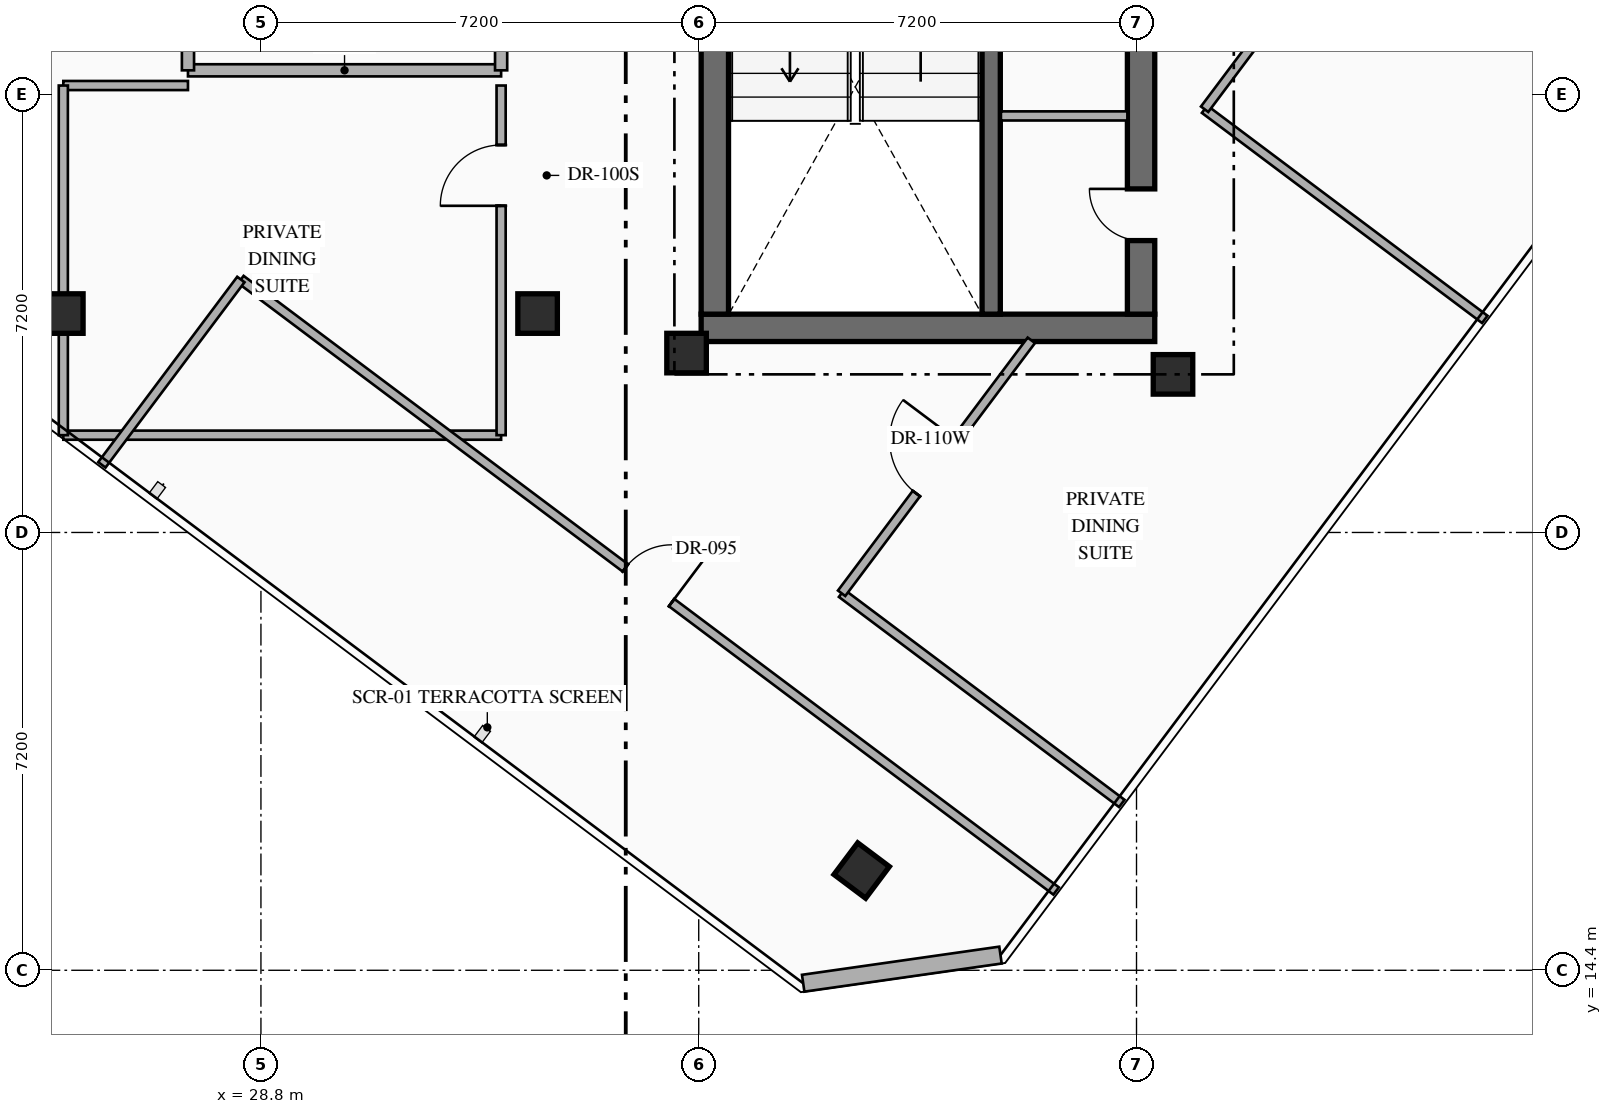
"""IFC4 building model, lengths in metres.
Left out: names, types, materials, properties, quantities, classifications, styles, units other than length and angle.
Written with IfcOpenShell. Run it as: python <this file> out.ifc"""

import sys

from ifc_helpers import new_model, si_unit, direction, frame, frame_2d, origin, origin_2d, place, context, subcontext, project, spatial, rectangle, hollow_rectangle, extrude, element, fill, save


model = new_model("IFC4")
c1 = context("Model", 3, precision=1e-05, world=origin(), true_north=direction((0.0, 1.0)))
c2 = subcontext(c1, "Body", "Model", "MODEL_VIEW")
j1 = project(units=[si_unit("LENGTHUNIT", "METRE"), si_unit("PLANEANGLEUNIT", "RADIAN")], contexts=[c1])
p1 = place(None, origin())
s1 = spatial("IfcSite", under=j1, at=p1, CompositionType="ELEMENT")
p2 = place(p1, origin())
s2 = spatial("IfcBuilding", under=s1, at=p2, CompositionType="ELEMENT")
p3 = place(p2, frame((0.0, 0.0, 257.55)))
s3 = spatial("IfcBuildingStorey", under=s2, at=p3, CompositionType="ELEMENT", Elevation=257.55)
p4 = place(p3, frame((36.04, 24.965, 0.0), z_axis=(0.0, 0.0, 1.0), x_axis=(1.0, 0.0, 0.0)))
e1 = element("IfcWall", 1, at=p4, inside=s3, PredefinedType="SHEAR", context=c2, shape_type="SweptSolid", body=[
    extrude(rectangle(XDim=7.46, YDim=0.45, at=frame_2d((3.73, 0.0))), origin(), (0.0, 0.0, 1.0), 4.2),
])
p5 = place(p3, frame((36.265, 25.19, 0.0), z_axis=(0.0, 0.0, 1.0), x_axis=(0.0, 1.0, 0.0)))
e2 = element("IfcWall", 2, at=p5, inside=s3, PredefinedType="SHEAR", context=c2, shape_type="SweptSolid", body=[
    extrude(rectangle(XDim=9.48, YDim=0.45, at=frame_2d((4.74, 0.0))), origin(), (0.0, 0.0, 1.0), 4.2),
])
p6 = place(p3, frame((43.275, 25.19, 0.0), z_axis=(0.0, 0.0, 1.0), x_axis=(0.0, 1.0, 0.0)))
e3 = element("IfcWall", 3, at=p6, inside=s3, PredefinedType="SHEAR", context=c2, shape_type="SweptSolid", body=[
    extrude(rectangle(XDim=9.48, YDim=0.45, at=frame_2d((4.74, 0.0))), origin(), (0.0, 0.0, 1.0), 4.2),
])
p7 = place(p6, frame((1.21, 0.0, 0.0)))
e4 = element("IfcOpeningElement", 4, at=p7, cuts=e3, PredefinedType="OPENING", context=c2, shape_type="SweptSolid", body=[
    extrude(rectangle(XDim=0.85, YDim=2.08, at=frame_2d((0.425, 1.04))), frame((0.0, 0.235, 0.0), z_axis=(0.0, -1.0, 0.0), x_axis=(1.0, 0.0, 0.0)), (0.0, 0.0, 1.0), 0.47),
])
p8 = place(p6, frame((4.46, 0.0, 0.0)))
e5 = element("IfcOpeningElement", 5, at=p8, cuts=e3, PredefinedType="OPENING", context=c2, shape_type="SweptSolid", body=[
    extrude(rectangle(XDim=0.85, YDim=2.08, at=frame_2d((0.425, 1.04))), frame((0.0, 0.235, 0.0), z_axis=(0.0, -1.0, 0.0), x_axis=(1.0, 0.0, 0.0)), (0.0, 0.0, 1.0), 0.47),
])
p9 = place(p3, frame((40.81, 25.19, 0.0), z_axis=(0.0, 0.0, 1.0), x_axis=(0.0, 1.0, 0.0)))
e6 = element("IfcWall", 6, at=p9, inside=s3, PredefinedType="SHEAR", context=c2, shape_type="SweptSolid", body=[
    extrude(rectangle(XDim=9.48, YDim=0.3, at=frame_2d((4.74, 0.0))), origin(), (0.0, 0.0, 1.0), 4.2),
])
for number, where, z_axis, x_axis in (
    (7, (35.8, 24.55, 0.0), (0.0, 0.0, 1.0), (1.0, 0.0, 0.0)),
    (8, (43.8, 24.2, 0.0), (0.0, 0.0, 1.0), (1.0, 0.0, 0.0)),
    (9, (25.55, 25.2, 0.0), (0.0, 0.0, 1.0), (1.0, 0.0, 0.0)),
    (10, (33.35, 25.2, 0.0), (0.0, 0.0, 1.0), (1.0, 0.0, 0.0)),
    (11, (38.68, 16.04, 0.0), (0.0, 0.0, 1.0), (0.8, -0.6, 0.0)),
):
    element("IfcColumn", number, at=place(p3, frame(where, z_axis=z_axis, x_axis=x_axis)), inside=s3, PredefinedType="COLUMN", context=c2, shape_type="SweptSolid", body=[
        extrude(hollow_rectangle(XDim=0.65, YDim=0.65, WallThickness=0.025, at=origin_2d()), origin(), (0.0, 0.0, 1.0), 4.2),
    ])
p10 = place(p3, frame((40.963, 14.65, 0.0), z_axis=(0.0, 0.0, 1.0), x_axis=(-0.989977778067, -0.141223223777, 0.0)))
e12 = element("IfcWall", 12, at=p10, inside=s3, PredefinedType="STANDARD", context=c2, shape_type="SweptSolid", body=[
    extrude(rectangle(XDim=3.278, YDim=0.28, at=frame_2d((1.639, 0.0))), origin(), (0.0, 0.0, 1.0), 3.95),
])
p11 = place(p3, frame((40.97, 28.45, 0.0), z_axis=(0.0, 0.0, 1.0), x_axis=(1.0, 0.0, 0.0)))
e13 = element("IfcWall", 13, at=p11, inside=s3, PredefinedType="PARTITIONING", context=c2, shape_type="SweptSolid", body=[
    extrude(rectangle(XDim=2.08, YDim=0.15, at=frame_2d((1.04, 0.0))), origin(), (0.0, 0.0, 1.0), 3.95),
])
p12 = place(p3, frame((27.6, 29.2, 0.0), z_axis=(0.0, 0.0, 1.0), x_axis=(1.0, 0.0, 0.0)))
e14 = element("IfcWall", 14, at=p12, inside=s3, PredefinedType="STANDARD", context=c2, shape_type="SweptSolid", body=[
    extrude(rectangle(XDim=5.15, YDim=0.2, at=frame_2d((2.575, 0.0))), origin(), (0.0, 0.0, 1.0), 3.95),
])
p13 = place(p3, frame((27.6, 29.2, 0.0), z_axis=(0.0, 0.0, 1.0), x_axis=(0.0, 1.0, 0.0)))
e15 = element("IfcWall", 15, at=p13, inside=s3, PredefinedType="STANDARD", context=c2, shape_type="SweptSolid", body=[
    extrude(rectangle(XDim=3.54, YDim=0.2, at=frame_2d((1.77, 0.0))), origin(), (0.0, 0.0, 1.0), 3.95),
])
p14 = place(p3, frame((32.75, 29.2, 0.0), z_axis=(0.0, 0.0, 1.0), x_axis=(0.0, 1.0, 0.0)))
e16 = element("IfcWall", 16, at=p14, inside=s3, PredefinedType="STANDARD", context=c2, shape_type="SweptSolid", body=[
    extrude(rectangle(XDim=3.54, YDim=0.2, at=frame_2d((1.77, 0.0))), origin(), (0.0, 0.0, 1.0), 3.95),
])
p15 = place(p14, frame((1.45, 0.0, 0.0)))
e17 = element("IfcOpeningElement", 17, at=p15, cuts=e16, PredefinedType="OPENING", context=c2, shape_type="SweptSolid", body=[
    extrude(rectangle(XDim=1.0, YDim=2.2, at=frame_2d((0.5, 1.1))), frame((0.0, 0.11, 0.0), z_axis=(0.0, -1.0, 0.0), x_axis=(1.0, 0.0, 0.0)), (0.0, 0.0, 1.0), 0.22),
])
p16 = place(p3, frame((25.55, 23.2, 0.0), z_axis=(0.0, 0.0, 1.0), x_axis=(1.0, 0.0, 0.0)))
e18 = element("IfcWall", 18, at=p16, inside=s3, PredefinedType="PARTITIONING", context=c2, shape_type="SweptSolid", body=[
    extrude(rectangle(XDim=7.2, YDim=0.15, at=frame_2d((3.6, 0.0))), origin(), (0.0, 0.0, 1.0), 3.95),
])
p17 = place(p3, frame((25.55, 28.95, 0.0), z_axis=(0.0, 0.0, 1.0), x_axis=(1.0, 0.0, 0.0)))
e19 = element("IfcWall", 19, at=p17, inside=s3, PredefinedType="PARTITIONING", context=c2, shape_type="SweptSolid", body=[
    extrude(rectangle(XDim=2.05, YDim=0.15, at=frame_2d((1.025, 0.0))), origin(), (0.0, 0.0, 1.0), 3.95),
])
p18 = place(p3, frame((25.55, 23.2, 0.0), z_axis=(0.0, 0.0, 1.0), x_axis=(0.0, 1.0, 0.0)))
e20 = element("IfcWall", 20, at=p18, inside=s3, PredefinedType="PARTITIONING", context=c2, shape_type="SweptSolid", body=[
    extrude(rectangle(XDim=5.75, YDim=0.15, at=frame_2d((2.875, 0.0))), origin(), (0.0, 0.0, 1.0), 2.445),
])
p19 = place(p3, frame((32.75, 23.2, 0.0), z_axis=(0.0, 0.0, 1.0), x_axis=(0.0, 1.0, 0.0)))
e21 = element("IfcWall", 21, at=p19, inside=s3, PredefinedType="PARTITIONING", context=c2, shape_type="SweptSolid", body=[
    extrude(rectangle(XDim=5.75, YDim=0.15, at=frame_2d((2.875, 0.0))), origin(), (0.0, 0.0, 1.0), 3.95),
])
p20 = place(p19, frame((3.772, 0.0, 0.0)))
e22 = element("IfcOpeningElement", 22, at=p20, cuts=e21, PredefinedType="OPENING", context=c2, shape_type="SweptSolid", body=[
    extrude(rectangle(XDim=1.0, YDim=2.15, at=frame_2d((0.5, 1.075))), frame((0.0, 0.085, 0.0), z_axis=(0.0, -1.0, 0.0), x_axis=(1.0, 0.0, 0.0)), (0.0, 0.0, 1.0), 0.17),
])
p21 = place(p3, frame((28.47, 25.76, 0.0), z_axis=(0.0, 0.0, 1.0), x_axis=(0.800001748029, -0.599997669287, 0.0)))
e23 = element("IfcWall", 23, at=p21, inside=s3, PredefinedType="PARTITIONING", context=c2, shape_type="SweptSolid", body=[
    extrude(rectangle(XDim=16.76, YDim=0.15, at=frame_2d((8.38, 0.0))), origin(), (0.0, 0.0, 1.0), 3.95),
])
p22 = place(p21, frame((7.905, 0.0, 0.0)))
e24 = element("IfcOpeningElement", 24, at=p22, cuts=e23, PredefinedType="OPENING", context=c2, shape_type="SweptSolid", body=[
    extrude(rectangle(XDim=0.95, YDim=2.15, at=frame_2d((0.475, 1.075))), frame((0.0, 0.085, 0.0), z_axis=(0.0, -1.0, 0.0), x_axis=(1.0, 0.0, 0.0)), (0.0, 0.0, 1.0), 0.17),
])
p23 = place(p3, frame((26.184, 22.712, 0.0), z_axis=(0.0, 0.0, 1.0), x_axis=(0.599969241761, 0.800023067755, 0.0)))
e25 = element("IfcWall", 25, at=p23, inside=s3, PredefinedType="PARTITIONING", context=c2, shape_type="SweptSolid", body=[
    extrude(rectangle(XDim=3.81, YDim=0.15, at=frame_2d((1.905, 0.0))), origin(), (0.0, 0.0, 1.0), 3.95),
])
for number, where, z_axis, x_axis in (
    (26, (38.35, 20.6, 0.0), (0.0, 0.0, 1.0), (0.8, -0.6, 0.0)),
    (27, (44.32, 28.56, 0.0), (0.0, 0.0, 1.0), (0.8, -0.6, 0.0)),
):
    element("IfcWall", number, at=place(p3, frame(where, z_axis=z_axis, x_axis=x_axis)), inside=s3, PredefinedType="PARTITIONING", context=c2, shape_type="SweptSolid", body=[
        extrude(rectangle(XDim=5.76, YDim=0.15, at=frame_2d((2.88, 0.0))), origin(), (0.0, 0.0, 1.0), 3.95),
    ])
p24 = place(p3, frame((38.35, 20.6, 0.0), z_axis=(0.0, 0.0, 1.0), x_axis=(0.599992487743, 0.800005634138, 0.0)))
e28 = element("IfcWall", 28, at=p24, inside=s3, PredefinedType="PARTITIONING", context=c2, shape_type="SweptSolid", body=[
    extrude(rectangle(XDim=5.2, YDim=0.15, at=frame_2d((2.6, 0.0))), origin(), (0.0, 0.0, 1.0), 3.95),
])
p25 = place(p24, frame((2.05, 0.0, 0.0)))
e29 = element("IfcOpeningElement", 29, at=p25, cuts=e28, PredefinedType="OPENING", context=c2, shape_type="SweptSolid", body=[
    extrude(rectangle(XDim=1.1, YDim=2.16, at=frame_2d((0.55, 1.08))), frame((0.0, 0.085, 0.0), z_axis=(0.0, -1.0, 0.0), x_axis=(1.0, 0.0, 0.0)), (0.0, 0.0, 1.0), 0.17),
])
p26 = place(p3, frame((44.32, 28.56, 0.0), z_axis=(0.0, 0.0, 1.0), x_axis=(0.6, 0.8, 0.0)))
e30 = element("IfcWall", 30, at=p26, inside=s3, PredefinedType="PARTITIONING", context=c2, shape_type="SweptSolid", body=[
    extrude(rectangle(XDim=10.16, YDim=0.15, at=frame_2d((5.08, 0.0))), origin(), (0.0, 0.0, 1.0), 3.95),
])
p27 = place(p26, frame((4.53, 0.0, 0.0)))
e31 = element("IfcOpeningElement", 31, at=p27, cuts=e30, PredefinedType="OPENING", context=c2, shape_type="SweptSolid", body=[
    extrude(rectangle(XDim=1.1, YDim=2.16, at=frame_2d((0.55, 1.08))), frame((0.0, 0.085, 0.0), z_axis=(0.0, -1.0, 0.0), x_axis=(1.0, 0.0, 0.0)), (0.0, 0.0, 1.0), 0.17),
])
p28 = place(p7, origin())
e32 = element("IfcDoor", 32, at=p28, inside=s3, OperationType="SINGLE_SWING_RIGHT", PredefinedType="DOOR", context=c2, shape_type="SweptSolid", body=[
    extrude(rectangle(XDim=0.85, YDim=2.08, at=frame_2d((0.425, 1.04))), frame((0.0, 0.025, 0.0), z_axis=(0.0, -1.0, 0.0), x_axis=(1.0, 0.0, 0.0)), (0.0, 0.0, 1.0), 0.05),
])
fill(e4, e32)
p29 = place(p20, origin())
e33 = element("IfcDoor", 33, at=p29, inside=s3, OperationType="SINGLE_SWING_LEFT", PredefinedType="DOOR", context=c2, shape_type="SweptSolid", body=[
    extrude(rectangle(XDim=1.0, YDim=2.15, at=frame_2d((0.5, 1.075))), frame((0.0, 0.025, 0.0), z_axis=(0.0, -1.0, 0.0), x_axis=(1.0, 0.0, 0.0)), (0.0, 0.0, 1.0), 0.05),
])
fill(e22, e33)
p30 = place(p22, origin())
e34 = element("IfcDoor", 34, at=p30, inside=s3, OperationType="SINGLE_SWING_RIGHT", PredefinedType="DOOR", context=c2, shape_type="SweptSolid", body=[
    extrude(rectangle(XDim=0.95, YDim=2.15, at=frame_2d((0.475, 1.075))), frame((0.0, 0.025, 0.0), z_axis=(0.0, -1.0, 0.0), x_axis=(1.0, 0.0, 0.0)), (0.0, 0.0, 1.0), 0.05),
])
fill(e24, e34)
p31 = place(p25, origin())
e35 = element("IfcDoor", 35, at=p31, inside=s3, OperationType="SINGLE_SWING_RIGHT", PredefinedType="DOOR", context=c2, shape_type="SweptSolid", body=[
    extrude(rectangle(XDim=1.1, YDim=2.16, at=frame_2d((0.55, 1.08))), frame((0.0, 0.025, 0.0), z_axis=(0.0, -1.0, 0.0), x_axis=(1.0, 0.0, 0.0)), (0.0, 0.0, 1.0), 0.05),
])
fill(e29, e35)
save(model, sys.argv[1])
